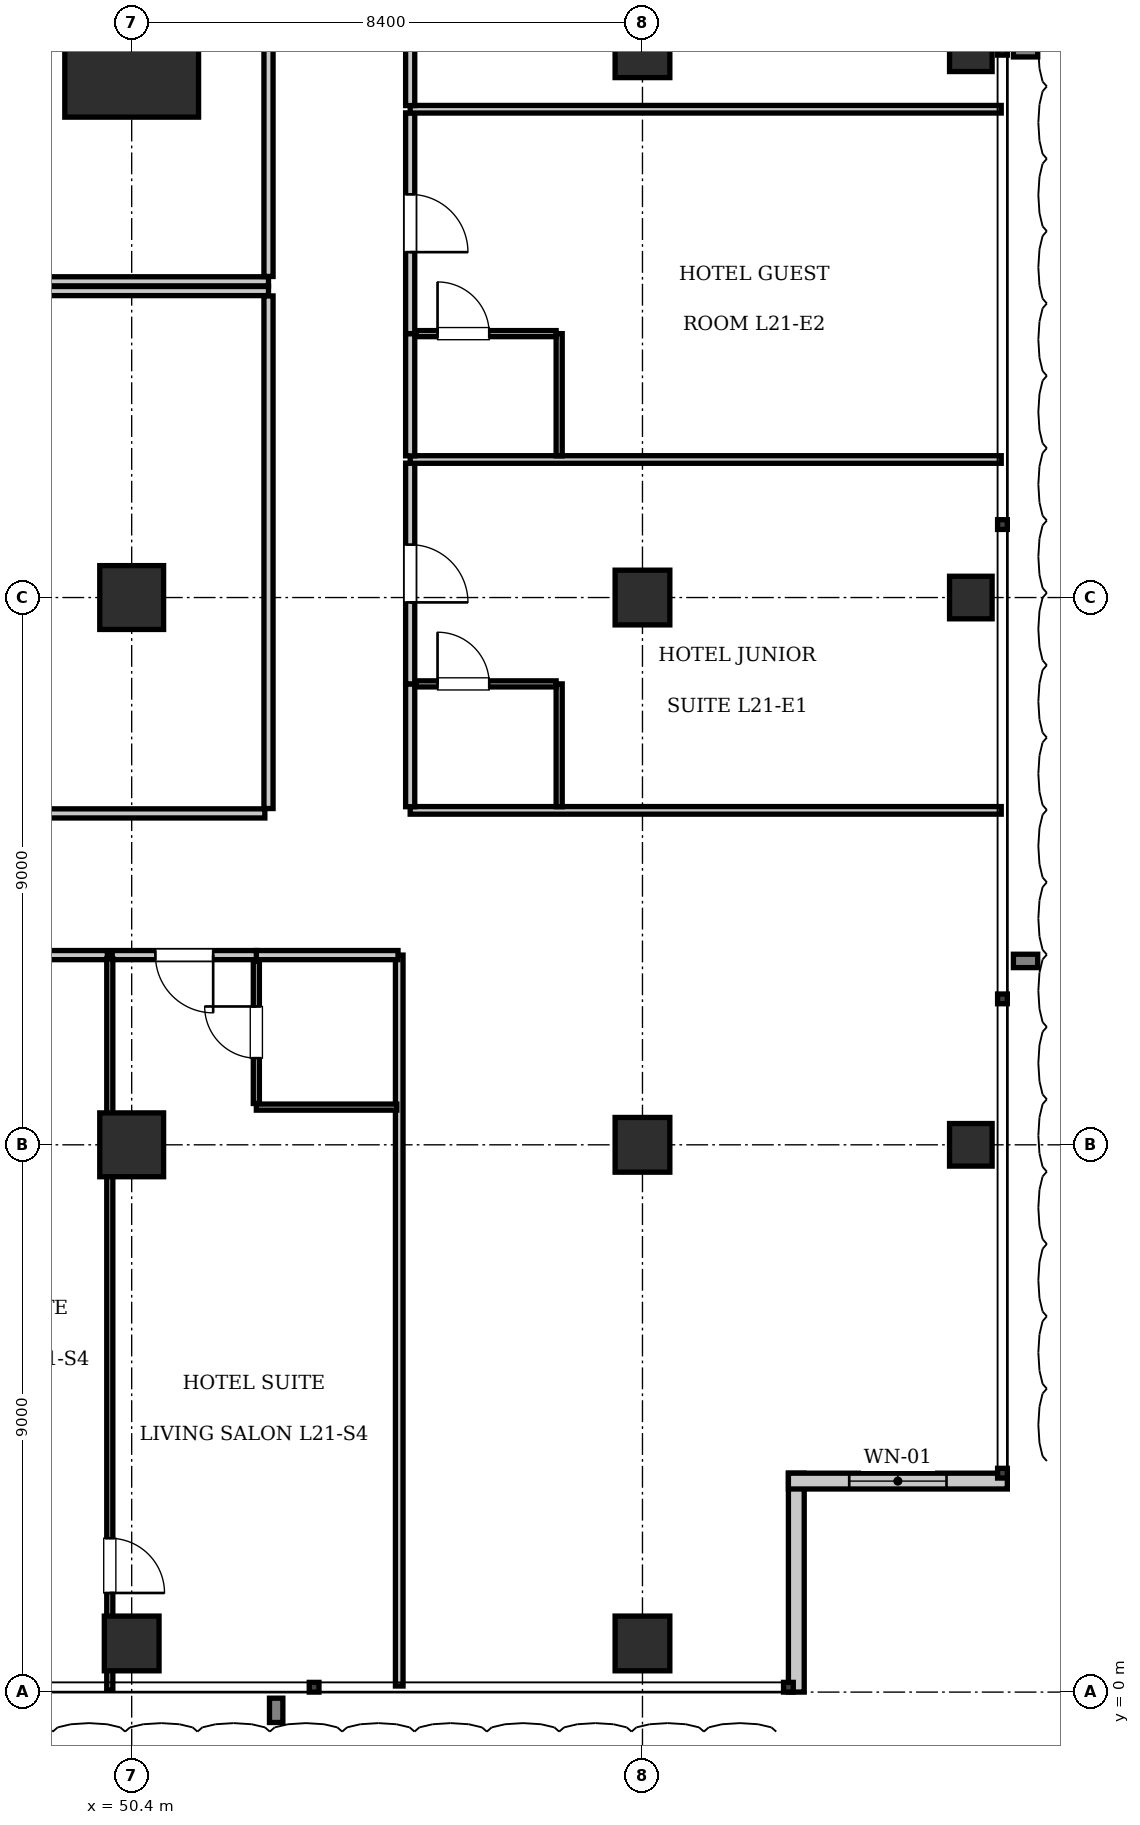
"""IFC4 building model, lengths in metres.
Left out: names, types, materials, properties, quantities, classifications, styles, units other than length and angle.
Written with IfcOpenShell. Run it as: python <this file> out.ifc"""

import sys

from ifc_helpers import new_model, si_unit, direction, frame, frame_2d, origin, origin_2d, place, context, subcontext, project, spatial, rectangle, i_section, extrude, element, fill, save


model = new_model("IFC4")
c1 = context("Model", 3, precision=1e-05, world=origin(), true_north=direction((0.0, 1.0)))
c2 = subcontext(c1, "Body", "Model", "MODEL_VIEW")
j1 = project(units=[si_unit("LENGTHUNIT", "METRE"), si_unit("PLANEANGLEUNIT", "RADIAN")], contexts=[c1])
p1 = place(None, origin())
s1 = spatial("IfcSite", under=j1, at=p1, CompositionType="ELEMENT")
p2 = place(p1, origin())
s2 = spatial("IfcBuilding", under=s1, at=p2, CompositionType="ELEMENT")
p3 = place(p2, frame((0.0, 0.0, 88.55)))
s3 = spatial("IfcBuildingStorey", under=s2, at=p3, CompositionType="ELEMENT", Elevation=88.55)
p4 = place(p3, frame((50.4, 27.0, 0.0), z_axis=(0.0, 0.0, 1.0), x_axis=(1.0, 0.0, 0.0)))
e1 = element("IfcColumn", 1, at=p4, inside=s3, PredefinedType="COLUMN", context=c2, shape_type="SweptSolid", body=[
    extrude(rectangle(XDim=2.2, YDim=2.2, at=origin_2d()), origin(), (0.0, 0.0, 1.0), 3.85),
])
for number, where, z_axis, x_axis in (
    (2, (50.4, 18.0, 0.0), (0.0, 0.0, 1.0), (1.0, 0.0, 0.0)),
    (3, (50.4, 9.0, 0.0), (0.0, 0.0, 1.0), (1.0, 0.0, 0.0)),
):
    element("IfcColumn", number, at=place(p3, frame(where, z_axis=z_axis, x_axis=x_axis)), inside=s3, PredefinedType="COLUMN", context=c2, shape_type="SweptSolid", body=[
        extrude(rectangle(XDim=1.05, YDim=1.05, at=origin_2d()), origin(), (0.0, 0.0, 1.0), 3.85),
    ])
for number, where, z_axis, x_axis in (
    (4, (58.8, 9.0, 0.0), (0.0, 0.0, 1.0), (1.0, 0.0, 0.0)),
    (5, (58.8, 18.0, 0.0), (0.0, 0.0, 1.0), (1.0, 0.0, 0.0)),
    (6, (58.8, 27.0, 0.0), (0.0, 0.0, 1.0), (1.0, 0.0, 0.0)),
    (7, (50.4, 0.8, 0.0), (0.0, 0.0, 1.0), (1.0, 0.0, 0.0)),
    (8, (58.8, 0.8, 0.0), (0.0, 0.0, 1.0), (1.0, 0.0, 0.0)),
):
    element("IfcColumn", number, at=place(p3, frame(where, z_axis=z_axis, x_axis=x_axis)), inside=s3, PredefinedType="COLUMN", context=c2, shape_type="SweptSolid", body=[
        extrude(rectangle(XDim=0.9, YDim=0.9, at=origin_2d()), origin(), (0.0, 0.0, 1.0), 3.85),
    ])
for number, where, z_axis, x_axis in (
    (9, (64.2, 9.0, 0.0), (0.0, 0.0, 1.0), (1.0, 0.0, 0.0)),
    (10, (64.2, 18.0, 0.0), (0.0, 0.0, 1.0), (1.0, 0.0, 0.0)),
    (11, (64.2, 27.0, 0.0), (0.0, 0.0, 1.0), (1.0, 0.0, 0.0)),
):
    element("IfcColumn", number, at=place(p3, frame(where, z_axis=z_axis, x_axis=x_axis)), inside=s3, PredefinedType="COLUMN", context=c2, shape_type="SweptSolid", body=[
        extrude(i_section(OverallWidth=0.7, OverallDepth=0.7, WebThickness=0.028, FlangeThickness=0.044, at=origin_2d()), origin(), (0.0, 0.0, 1.0), 3.85),
    ])
p5 = place(p3, frame((61.33, 3.6, 0.0), z_axis=(0.0, 0.0, 1.0), x_axis=(0.0, -1.0, 0.0)))
e12 = element("IfcWall", 12, at=p5, inside=s3, PredefinedType="SOLIDWALL", context=c2, shape_type="SweptSolid", body=[
    extrude(rectangle(XDim=3.6, YDim=0.26, at=frame_2d((1.8, 0.0))), origin(), (0.0, 0.0, 1.0), 3.61),
])
p6 = place(p3, frame((64.8, 3.47, 0.0), z_axis=(0.0, 0.0, 1.0), x_axis=(-1.0, 0.0, 0.0)))
e13 = element("IfcWall", 13, at=p6, inside=s3, PredefinedType="SOLIDWALL", context=c2, shape_type="SweptSolid", body=[
    extrude(rectangle(XDim=3.6, YDim=0.26, at=frame_2d((1.8, 0.0))), origin(), (0.0, 0.0, 1.0), 3.61),
])
p7 = place(p6, frame((1.0, 0.0, 0.9)))
e14 = element("IfcOpeningElement", 14, at=p7, cuts=e13, PredefinedType="OPENING", context=c2, shape_type="SweptSolid", body=[
    extrude(rectangle(XDim=1.6, YDim=2.1, at=frame_2d((0.8, 1.05))), frame((0.0, 0.14, 0.0), z_axis=(0.0, -1.0, 0.0), x_axis=(1.0, 0.0, 0.0)), (0.0, 0.0, 1.0), 0.28),
])
p8 = place(p3, frame((22.95, 23.2, 0.0), z_axis=(0.0, 0.0, 1.0), x_axis=(1.0, 0.0, 0.0)))
e15 = element("IfcWall", 15, at=p8, inside=s3, PredefinedType="PARTITIONING", context=c2, shape_type="SweptSolid", body=[
    extrude(rectangle(XDim=29.7, YDim=0.15, at=frame_2d((14.85, 0.0))), origin(), (0.0, 0.0, 1.0), 3.61),
])
p9 = place(p3, frame((52.65, 23.28, 0.0), z_axis=(0.0, 0.0, 1.0), x_axis=(0.0, 1.0, 0.0)))
e16 = element("IfcWall", 16, at=p9, inside=s3, PredefinedType="PARTITIONING", context=c2, shape_type="SweptSolid", body=[
    extrude(rectangle(XDim=8.44, YDim=0.15, at=frame_2d((4.22, 0.0))), origin(), (0.0, 0.0, 1.0), 3.61),
])
p10 = place(p3, frame((22.95, 23.04, 0.0), z_axis=(0.0, 0.0, 1.0), x_axis=(1.0, 0.0, 0.0)))
e17 = element("IfcWall", 17, at=p10, inside=s3, PredefinedType="PARTITIONING", context=c2, shape_type="SweptSolid", body=[
    extrude(rectangle(XDim=29.7, YDim=0.15, at=frame_2d((14.85, 0.0))), origin(), (0.0, 0.0, 1.0), 3.61),
])
p11 = place(p3, frame((52.65, 14.53, 0.0), z_axis=(0.0, 0.0, 1.0), x_axis=(0.0, 1.0, 0.0)))
e18 = element("IfcWall", 18, at=p11, inside=s3, PredefinedType="PARTITIONING", context=c2, shape_type="SweptSolid", body=[
    extrude(rectangle(XDim=8.43, YDim=0.15, at=frame_2d((4.215, 0.0))), origin(), (0.0, 0.0, 1.0), 3.61),
])
p12 = place(p3, frame((33.969, 14.45, 0.0), z_axis=(0.0, 0.0, 1.0), x_axis=(1.0, 0.0, 0.0)))
e19 = element("IfcWall", 19, at=p12, inside=s3, PredefinedType="PARTITIONING", context=c2, shape_type="SweptSolid", body=[
    extrude(rectangle(XDim=18.621, YDim=0.15, at=frame_2d((9.311, 0.0))), origin(), (0.0, 0.0, 1.0), 3.61),
])
p13 = place(p12, frame((8.861, 0.0, 0.0)))
e20 = element("IfcOpeningElement", 20, at=p13, cuts=e19, PredefinedType="OPENING", context=c2, shape_type="SweptSolid", body=[
    extrude(rectangle(XDim=0.9, YDim=2.1, at=frame_2d((0.45, 1.05))), frame((0.0, 0.085, 0.0), z_axis=(0.0, -1.0, 0.0), x_axis=(1.0, 0.0, 0.0)), (0.0, 0.0, 1.0), 0.17),
])
p14 = place(p3, frame((54.8, 0.1, 0.0), z_axis=(0.0, 0.0, 1.0), x_axis=(0.0, 1.0, 0.0)))
e21 = element("IfcWall", 21, at=p14, inside=s3, PredefinedType="PARTITIONING", context=c2, shape_type="SweptSolid", body=[
    extrude(rectangle(XDim=12.02, YDim=0.125, at=frame_2d((6.01, 0.0))), origin(), (0.0, 0.0, 1.0), 3.61),
])
p15 = place(p3, frame((52.45, 12.12, 0.0), z_axis=(0.0, 0.0, 1.0), x_axis=(1.0, 0.0, 0.0)))
e22 = element("IfcWall", 22, at=p15, inside=s3, PredefinedType="PARTITIONING", context=c2, shape_type="SweptSolid", body=[
    extrude(rectangle(XDim=2.33, YDim=0.15, at=frame_2d((1.165, 0.0))), origin(), (0.0, 0.0, 1.0), 3.61),
])
p16 = place(p3, frame((52.45, 9.62, 0.0), z_axis=(0.0, 0.0, 1.0), x_axis=(1.0, 0.0, 0.0)))
e23 = element("IfcWall", 23, at=p16, inside=s3, PredefinedType="PARTITIONING", context=c2, shape_type="SweptSolid", body=[
    extrude(rectangle(XDim=2.31, YDim=0.1, at=frame_2d((1.155, 0.0))), origin(), (0.0, 0.0, 1.0), 3.61),
])
p17 = place(p3, frame((52.45, 9.68, 0.0), z_axis=(0.0, 0.0, 1.0), x_axis=(0.0, 1.0, 0.0)))
e24 = element("IfcWall", 24, at=p17, inside=s3, PredefinedType="PARTITIONING", context=c2, shape_type="SweptSolid", body=[
    extrude(rectangle(XDim=2.34, YDim=0.1, at=frame_2d((1.17, 0.0))), origin(), (0.0, 0.0, 1.0), 3.61),
])
p18 = place(p17, frame((0.745, 0.0, 0.0)))
e25 = element("IfcOpeningElement", 25, at=p18, cuts=e24, PredefinedType="OPENING", context=c2, shape_type="SweptSolid", body=[
    extrude(rectangle(XDim=0.85, YDim=2.1, at=frame_2d((0.425, 1.05))), frame((0.0, 0.06, 0.0), z_axis=(0.0, -1.0, 0.0), x_axis=(1.0, 0.0, 0.0)), (0.0, 0.0, 1.0), 0.12),
])
p19 = place(p3, frame((46.32, 12.12, 0.0), z_axis=(0.0, 0.0, 1.0), x_axis=(1.0, 0.0, 0.0)))
e26 = element("IfcWall", 26, at=p19, inside=s3, PredefinedType="PARTITIONING", context=c2, shape_type="SweptSolid", body=[
    extrude(rectangle(XDim=3.68, YDim=0.15, at=frame_2d((1.84, 0.0))), origin(), (0.0, 0.0, 1.0), 3.61),
])
p20 = place(p3, frame((50.08, 12.12, 0.0), z_axis=(0.0, 0.0, 1.0), x_axis=(1.0, 0.0, 0.0)))
e27 = element("IfcWall", 27, at=p20, inside=s3, PredefinedType="PARTITIONING", context=c2, shape_type="SweptSolid", body=[
    extrude(rectangle(XDim=2.37, YDim=0.15, at=frame_2d((1.185, 0.0))), origin(), (0.0, 0.0, 1.0), 3.61),
])
p21 = place(p20, frame((0.71, 0.0, 0.0)))
e28 = element("IfcOpeningElement", 28, at=p21, cuts=e27, PredefinedType="OPENING", context=c2, shape_type="SweptSolid", body=[
    extrude(rectangle(XDim=0.95, YDim=2.15, at=frame_2d((0.475, 1.075))), frame((0.0, 0.085, 0.0), z_axis=(0.0, -1.0, 0.0), x_axis=(1.0, 0.0, 0.0)), (0.0, 0.0, 1.0), 0.17),
])
p22 = place(p3, frame((50.04, 0.03, 0.0), z_axis=(0.0, 0.0, 1.0), x_axis=(0.0, 1.0, 0.0)))
e29 = element("IfcWall", 29, at=p22, inside=s3, PredefinedType="PARTITIONING", context=c2, shape_type="SweptSolid", body=[
    extrude(rectangle(XDim=12.03, YDim=0.1, at=frame_2d((6.015, 0.0))), origin(), (0.0, 0.0, 1.0), 3.61),
])
p23 = place(p22, frame((1.6, 0.0, 0.0)))
e30 = element("IfcOpeningElement", 30, at=p23, cuts=e29, PredefinedType="OPENING", context=c2, shape_type="SweptSolid", body=[
    extrude(rectangle(XDim=0.9, YDim=2.1, at=frame_2d((0.45, 1.05))), frame((0.0, 0.06, 0.0), z_axis=(0.0, -1.0, 0.0), x_axis=(1.0, 0.0, 0.0)), (0.0, 0.0, 1.0), 0.12),
])
p24 = place(p3, frame((54.98, 14.5, 0.0), z_axis=(0.0, 0.0, 1.0), x_axis=(1.0, 0.0, 0.0)))
e31 = element("IfcWall", 31, at=p24, inside=s3, PredefinedType="PARTITIONING", context=c2, shape_type="SweptSolid", body=[
    extrude(rectangle(XDim=9.72, YDim=0.125, at=frame_2d((4.86, 0.0))), origin(), (0.0, 0.0, 1.0), 3.61),
])
p25 = place(p3, frame((54.98, 14.56, 0.0), z_axis=(0.0, 0.0, 1.0), x_axis=(0.0, 1.0, 0.0)))
e32 = element("IfcWall", 32, at=p25, inside=s3, PredefinedType="PARTITIONING", context=c2, shape_type="SweptSolid", body=[
    extrude(rectangle(XDim=2.02, YDim=0.15, at=frame_2d((1.01, 0.0))), origin(), (0.0, 0.0, 1.0), 3.61),
])
p26 = place(p3, frame((54.98, 16.58, 0.0), z_axis=(0.0, 0.0, 1.0), x_axis=(0.0, 1.0, 0.0)))
e33 = element("IfcWall", 33, at=p26, inside=s3, PredefinedType="PARTITIONING", context=c2, shape_type="SweptSolid", body=[
    extrude(rectangle(XDim=3.63, YDim=0.15, at=frame_2d((1.815, 0.0))), origin(), (0.0, 0.0, 1.0), 3.61),
])
p27 = place(p26, frame((1.34, 0.0, 0.0)))
e34 = element("IfcOpeningElement", 34, at=p27, cuts=e33, PredefinedType="OPENING", context=c2, shape_type="SweptSolid", body=[
    extrude(rectangle(XDim=0.95, YDim=2.15, at=frame_2d((0.475, 1.075))), frame((0.0, 0.085, 0.0), z_axis=(0.0, -1.0, 0.0), x_axis=(1.0, 0.0, 0.0)), (0.0, 0.0, 1.0), 0.17),
])
p28 = place(p3, frame((57.43, 14.56, 0.0), z_axis=(0.0, 0.0, 1.0), x_axis=(0.0, 1.0, 0.0)))
e35 = element("IfcWall", 35, at=p28, inside=s3, PredefinedType="PARTITIONING", context=c2, shape_type="SweptSolid", body=[
    extrude(rectangle(XDim=2.02, YDim=0.1, at=frame_2d((1.01, 0.0))), origin(), (0.0, 0.0, 1.0), 3.61),
])
p29 = place(p3, frame((55.08, 16.58, 0.0), z_axis=(0.0, 0.0, 1.0), x_axis=(1.0, 0.0, 0.0)))
e36 = element("IfcWall", 36, at=p29, inside=s3, PredefinedType="PARTITIONING", context=c2, shape_type="SweptSolid", body=[
    extrude(rectangle(XDim=2.3, YDim=0.1, at=frame_2d((1.15, 0.0))), origin(), (0.0, 0.0, 1.0), 3.61),
])
p30 = place(p29, frame((0.35, 0.0, 0.0)))
e37 = element("IfcOpeningElement", 37, at=p30, cuts=e36, PredefinedType="OPENING", context=c2, shape_type="SweptSolid", body=[
    extrude(rectangle(XDim=0.85, YDim=2.1, at=frame_2d((0.425, 1.05))), frame((0.0, 0.06, 0.0), z_axis=(0.0, -1.0, 0.0), x_axis=(1.0, 0.0, 0.0)), (0.0, 0.0, 1.0), 0.12),
])
p31 = place(p3, frame((54.98, 20.27, 0.0), z_axis=(0.0, 0.0, 1.0), x_axis=(1.0, 0.0, 0.0)))
e38 = element("IfcWall", 38, at=p31, inside=s3, PredefinedType="PARTITIONING", context=c2, shape_type="SweptSolid", body=[
    extrude(rectangle(XDim=9.72, YDim=0.125, at=frame_2d((4.86, 0.0))), origin(), (0.0, 0.0, 1.0), 3.61),
])
p32 = place(p3, frame((54.98, 20.33, 0.0), z_axis=(0.0, 0.0, 1.0), x_axis=(0.0, 1.0, 0.0)))
e39 = element("IfcWall", 39, at=p32, inside=s3, PredefinedType="PARTITIONING", context=c2, shape_type="SweptSolid", body=[
    extrude(rectangle(XDim=2.01, YDim=0.15, at=frame_2d((1.005, 0.0))), origin(), (0.0, 0.0, 1.0), 3.61),
])
p33 = place(p3, frame((54.98, 22.34, 0.0), z_axis=(0.0, 0.0, 1.0), x_axis=(0.0, 1.0, 0.0)))
e40 = element("IfcWall", 40, at=p33, inside=s3, PredefinedType="PARTITIONING", context=c2, shape_type="SweptSolid", body=[
    extrude(rectangle(XDim=3.63, YDim=0.15, at=frame_2d((1.815, 0.0))), origin(), (0.0, 0.0, 1.0), 3.61),
])
p34 = place(p33, frame((1.34, 0.0, 0.0)))
e41 = element("IfcOpeningElement", 41, at=p34, cuts=e40, PredefinedType="OPENING", context=c2, shape_type="SweptSolid", body=[
    extrude(rectangle(XDim=0.95, YDim=2.15, at=frame_2d((0.475, 1.075))), frame((0.0, 0.085, 0.0), z_axis=(0.0, -1.0, 0.0), x_axis=(1.0, 0.0, 0.0)), (0.0, 0.0, 1.0), 0.17),
])
p35 = place(p3, frame((57.43, 20.33, 0.0), z_axis=(0.0, 0.0, 1.0), x_axis=(0.0, 1.0, 0.0)))
e42 = element("IfcWall", 42, at=p35, inside=s3, PredefinedType="PARTITIONING", context=c2, shape_type="SweptSolid", body=[
    extrude(rectangle(XDim=2.01, YDim=0.1, at=frame_2d((1.005, 0.0))), origin(), (0.0, 0.0, 1.0), 3.61),
])
p36 = place(p3, frame((55.08, 22.34, 0.0), z_axis=(0.0, 0.0, 1.0), x_axis=(1.0, 0.0, 0.0)))
e43 = element("IfcWall", 43, at=p36, inside=s3, PredefinedType="PARTITIONING", context=c2, shape_type="SweptSolid", body=[
    extrude(rectangle(XDim=2.3, YDim=0.1, at=frame_2d((1.15, 0.0))), origin(), (0.0, 0.0, 1.0), 3.61),
])
p37 = place(p36, frame((0.35, 0.0, 0.0)))
e44 = element("IfcOpeningElement", 44, at=p37, cuts=e43, PredefinedType="OPENING", context=c2, shape_type="SweptSolid", body=[
    extrude(rectangle(XDim=0.85, YDim=2.1, at=frame_2d((0.425, 1.05))), frame((0.0, 0.06, 0.0), z_axis=(0.0, -1.0, 0.0), x_axis=(1.0, 0.0, 0.0)), (0.0, 0.0, 1.0), 0.12),
])
p38 = place(p3, frame((54.98, 26.03, 0.0), z_axis=(0.0, 0.0, 1.0), x_axis=(1.0, 0.0, 0.0)))
e45 = element("IfcWall", 45, at=p38, inside=s3, PredefinedType="PARTITIONING", context=c2, shape_type="SweptSolid", body=[
    extrude(rectangle(XDim=9.72, YDim=0.125, at=frame_2d((4.86, 0.0))), origin(), (0.0, 0.0, 1.0), 3.61),
])
p39 = place(p3, frame((54.98, 26.09, 0.0), z_axis=(0.0, 0.0, 1.0), x_axis=(0.0, 1.0, 0.0)))
e46 = element("IfcWall", 46, at=p39, inside=s3, PredefinedType="PARTITIONING", context=c2, shape_type="SweptSolid", body=[
    extrude(rectangle(XDim=3.63, YDim=0.15, at=frame_2d((1.815, 0.0))), origin(), (0.0, 0.0, 1.0), 3.61),
])
p40 = place(p39, frame((1.34, 0.0, 0.0)))
e47 = element("IfcOpeningElement", 47, at=p40, cuts=e46, PredefinedType="OPENING", context=c2, shape_type="SweptSolid", body=[
    extrude(rectangle(XDim=0.95, YDim=2.15, at=frame_2d((0.475, 1.075))), frame((0.0, 0.085, 0.0), z_axis=(0.0, -1.0, 0.0), x_axis=(1.0, 0.0, 0.0)), (0.0, 0.0, 1.0), 0.17),
])
p41 = place(p7, origin())
e48 = element("IfcWindow", 48, at=p41, inside=s3, PartitioningType="SINGLE_PANEL", PredefinedType="WINDOW", context=c2, shape_type="SweptSolid", body=[
    extrude(rectangle(XDim=1.6, YDim=2.1, at=frame_2d((0.8, 1.05))), frame((0.0, 0.03, 0.0), z_axis=(0.0, -1.0, 0.0), x_axis=(1.0, 0.0, 0.0)), (0.0, 0.0, 1.0), 0.06),
])
fill(e14, e48)
p42 = place(p18, origin())
e49 = element("IfcDoor", 49, at=p42, inside=s3, OperationType="SINGLE_SWING_RIGHT", PredefinedType="DOOR", context=c2, shape_type="SweptSolid", body=[
    extrude(rectangle(XDim=0.85, YDim=2.1, at=frame_2d((0.425, 1.05))), frame((0.0, 0.025, 0.0), z_axis=(0.0, -1.0, 0.0), x_axis=(1.0, 0.0, 0.0)), (0.0, 0.0, 1.0), 0.05),
])
fill(e25, e49)
p43 = place(p21, frame((0.95, 0.0, 0.0), z_axis=(0.0, 0.0, 1.0), x_axis=(-1.0, 0.0, 0.0)))
e50 = element("IfcDoor", 50, at=p43, inside=s3, OperationType="SINGLE_SWING_LEFT", PredefinedType="DOOR", context=c2, shape_type="SweptSolid", body=[
    extrude(rectangle(XDim=0.95, YDim=2.15, at=frame_2d((0.475, 1.075))), frame((0.0, 0.025, 0.0), z_axis=(0.0, -1.0, 0.0), x_axis=(1.0, 0.0, 0.0)), (0.0, 0.0, 1.0), 0.05),
])
fill(e28, e50)
p44 = place(p23, frame((0.9, 0.0, 0.0), z_axis=(0.0, 0.0, 1.0), x_axis=(-1.0, 0.0, 0.0)))
e51 = element("IfcDoor", 51, at=p44, inside=s3, OperationType="SINGLE_SWING_RIGHT", PredefinedType="DOOR", context=c2, shape_type="SweptSolid", body=[
    extrude(rectangle(XDim=0.9, YDim=2.1, at=frame_2d((0.45, 1.05))), frame((0.0, 0.025, 0.0), z_axis=(0.0, -1.0, 0.0), x_axis=(1.0, 0.0, 0.0)), (0.0, 0.0, 1.0), 0.05),
])
fill(e30, e51)
p45 = place(p30, origin())
e52 = element("IfcDoor", 52, at=p45, inside=s3, OperationType="SINGLE_SWING_LEFT", PredefinedType="DOOR", context=c2, shape_type="SweptSolid", body=[
    extrude(rectangle(XDim=0.85, YDim=2.1, at=frame_2d((0.425, 1.05))), frame((0.0, 0.025, 0.0), z_axis=(0.0, -1.0, 0.0), x_axis=(1.0, 0.0, 0.0)), (0.0, 0.0, 1.0), 0.05),
])
fill(e37, e52)
p46 = place(p27, frame((0.95, 0.0, 0.0), z_axis=(0.0, 0.0, 1.0), x_axis=(-1.0, 0.0, 0.0)))
e53 = element("IfcDoor", 53, at=p46, inside=s3, OperationType="SINGLE_SWING_RIGHT", PredefinedType="DOOR", context=c2, shape_type="SweptSolid", body=[
    extrude(rectangle(XDim=0.95, YDim=2.15, at=frame_2d((0.475, 1.075))), frame((0.0, 0.025, 0.0), z_axis=(0.0, -1.0, 0.0), x_axis=(1.0, 0.0, 0.0)), (0.0, 0.0, 1.0), 0.05),
])
fill(e34, e53)
p47 = place(p37, origin())
e54 = element("IfcDoor", 54, at=p47, inside=s3, OperationType="SINGLE_SWING_LEFT", PredefinedType="DOOR", context=c2, shape_type="SweptSolid", body=[
    extrude(rectangle(XDim=0.85, YDim=2.1, at=frame_2d((0.425, 1.05))), frame((0.0, 0.025, 0.0), z_axis=(0.0, -1.0, 0.0), x_axis=(1.0, 0.0, 0.0)), (0.0, 0.0, 1.0), 0.05),
])
fill(e44, e54)
p48 = place(p34, frame((0.95, 0.0, 0.0), z_axis=(0.0, 0.0, 1.0), x_axis=(-1.0, 0.0, 0.0)))
e55 = element("IfcDoor", 55, at=p48, inside=s3, OperationType="SINGLE_SWING_RIGHT", PredefinedType="DOOR", context=c2, shape_type="SweptSolid", body=[
    extrude(rectangle(XDim=0.95, YDim=2.15, at=frame_2d((0.475, 1.075))), frame((0.0, 0.025, 0.0), z_axis=(0.0, -1.0, 0.0), x_axis=(1.0, 0.0, 0.0)), (0.0, 0.0, 1.0), 0.05),
])
fill(e41, e55)
save(model, sys.argv[1])
